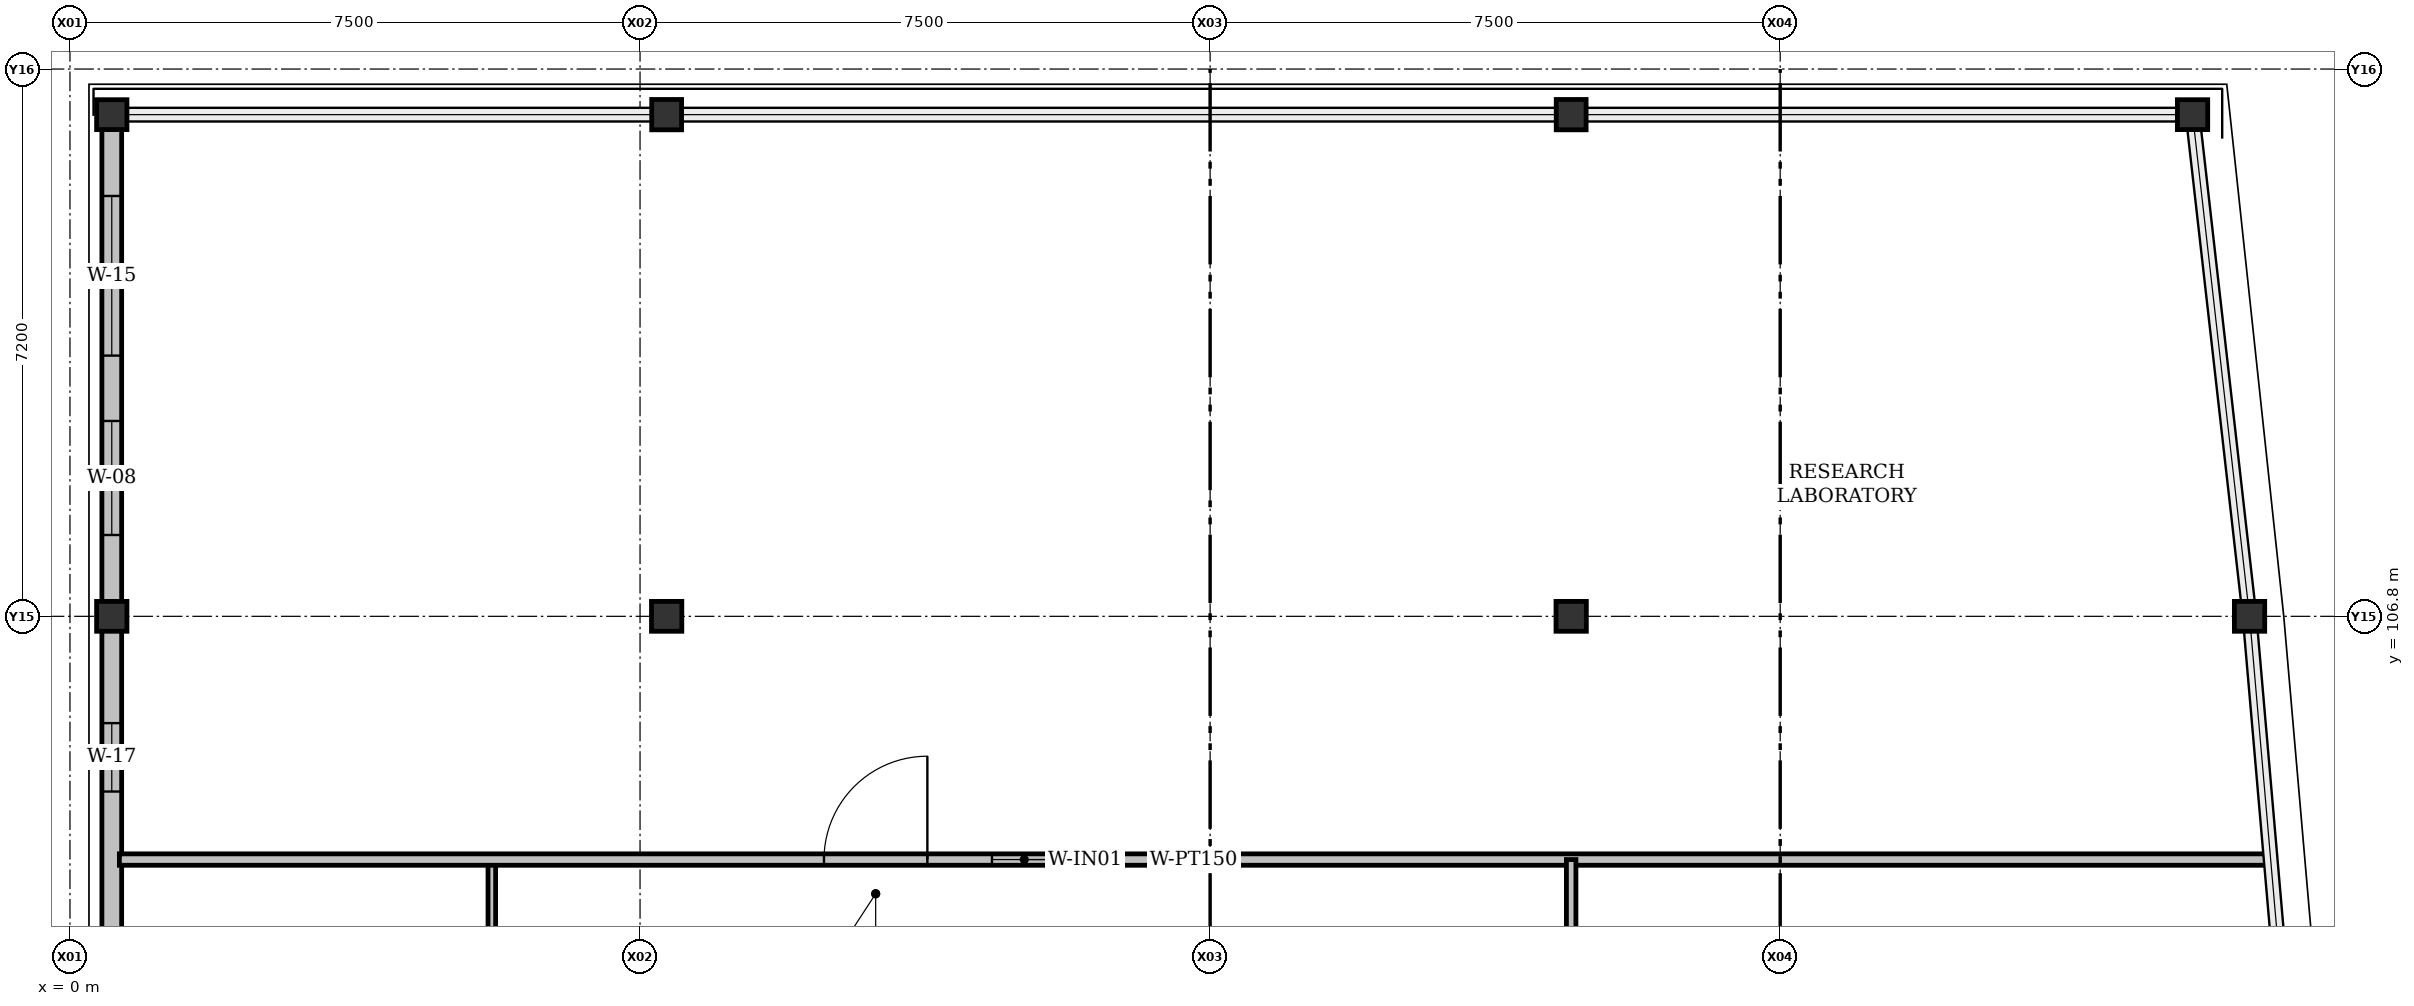
"""IFC4 building model, lengths in metres.
Left out: names, types, materials, properties, quantities, classifications, styles, units other than length and angle.
Written with IfcOpenShell. Run it as: python <this file> out.ifc"""

import sys

from ifc_helpers import new_model, si_unit, direction, frame, frame_2d, origin, origin_2d, place, context, subcontext, project, spatial, rectangle, i_section, extrude, element, fill, save


model = new_model("IFC4")
c1 = context("Model", 3, precision=1e-05, world=origin(), true_north=direction((0.0, 1.0)))
c2 = subcontext(c1, "Body", "Model", "MODEL_VIEW")
j1 = project(units=[si_unit("LENGTHUNIT", "METRE"), si_unit("PLANEANGLEUNIT", "RADIAN")], contexts=[c1])
p1 = place(None, origin())
s1 = spatial("IfcSite", under=j1, at=p1, CompositionType="ELEMENT")
p2 = place(p1, origin())
s2 = spatial("IfcBuilding", under=s1, at=p2, CompositionType="ELEMENT")
p3 = place(p2, frame((0.0, 0.0, 5.4)))
s3 = spatial("IfcBuildingStorey", under=s2, at=p3, CompositionType="ELEMENT", Elevation=5.4)
for number, where, z_axis, x_axis in (
    (1, (0.55, 106.8, 0.0), (0.0, 0.0, 1.0), (1.0, 0.0, 0.0)),
    (2, (7.85, 106.8, 0.0), (0.0, 0.0, 1.0), (1.0, 0.0, 0.0)),
    (3, (19.75, 106.8, 0.0), (0.0, 0.0, 1.0), (1.0, 0.0, 0.0)),
    (4, (28.675, 106.8, 0.0), (0.0, 0.0, 1.0), (1.0, 0.0, 0.0)),
    (5, (0.55, 113.4, 0.0), (0.0, 0.0, 1.0), (1.0, 0.0, 0.0)),
    (6, (7.85, 113.4, 0.0), (0.0, 0.0, 1.0), (0.0, 1.0, 0.0)),
    (7, (19.75, 113.4, 0.0), (0.0, 0.0, 1.0), (0.0, 1.0, 0.0)),
    (8, (27.925, 113.4, 0.0), (0.0, 0.0, 1.0), (1.0, 0.0, 0.0)),
):
    element("IfcColumn", number, at=place(p3, frame(where, z_axis=z_axis, x_axis=x_axis)), inside=s3, PredefinedType="COLUMN", context=c2, shape_type="SweptSolid", body=[
        extrude(i_section(OverallWidth=0.399, OverallDepth=0.393, WebThickness=0.023, FlangeThickness=0.036, FilletRadius=0.015, at=origin_2d()), origin(), (0.0, 0.0, 1.0), 4.5),
    ])
p4 = place(p3, frame((0.55, 99.6, 0.0), z_axis=(0.0, 0.0, 1.0), x_axis=(0.0, 1.0, 0.0)))
e9 = element("IfcWall", 9, at=p4, inside=s3, PredefinedType="SOLIDWALL", context=c2, shape_type="SweptSolid", body=[
    extrude(rectangle(XDim=7.2, YDim=0.26, at=frame_2d((3.6, 0.0))), origin(), (0.0, 0.0, 1.0), 3.847),
])
p5 = place(p4, frame((1.655, 0.0, 0.92)))
e10 = element("IfcOpeningElement", 10, at=p5, cuts=e9, PredefinedType="OPENING", context=c2, shape_type="SweptSolid", body=[
    extrude(rectangle(XDim=1.2, YDim=1.55, at=frame_2d((0.6, 0.775))), frame((0.0, 0.13, 0.0), z_axis=(0.0, -1.0, 0.0), x_axis=(1.0, 0.0, 0.0)), (0.0, 0.0, 1.0), 0.26),
])
p6 = place(p4, frame((4.895, 0.0, 0.92)))
e11 = element("IfcOpeningElement", 11, at=p6, cuts=e9, PredefinedType="OPENING", context=c2, shape_type="SweptSolid", body=[
    extrude(rectangle(XDim=0.9, YDim=1.3, at=frame_2d((0.45, 0.65))), frame((0.0, 0.13, 0.0), z_axis=(0.0, -1.0, 0.0), x_axis=(1.0, 0.0, 0.0)), (0.0, 0.0, 1.0), 0.26),
])
p7 = place(p3, frame((0.55, 106.8, 0.0), z_axis=(0.0, 0.0, 1.0), x_axis=(0.0, 1.0, 0.0)))
e12 = element("IfcWall", 12, at=p7, inside=s3, PredefinedType="SOLIDWALL", context=c2, shape_type="SweptSolid", body=[
    extrude(rectangle(XDim=6.6, YDim=0.26, at=frame_2d((3.3, 0.0))), origin(), (0.0, 0.0, 1.0), 3.847),
])
p8 = place(p7, frame((1.07, 0.0, 0.92)))
e13 = element("IfcOpeningElement", 13, at=p8, cuts=e12, PredefinedType="OPENING", context=c2, shape_type="SweptSolid", body=[
    extrude(rectangle(XDim=1.5, YDim=1.55, at=frame_2d((0.75, 0.775))), frame((0.0, 0.13, 0.0), z_axis=(0.0, -1.0, 0.0), x_axis=(1.0, 0.0, 0.0)), (0.0, 0.0, 1.0), 0.26),
])
p9 = place(p7, frame((3.43, 0.0, 0.92)))
e14 = element("IfcOpeningElement", 14, at=p9, cuts=e12, PredefinedType="OPENING", context=c2, shape_type="SweptSolid", body=[
    extrude(rectangle(XDim=2.1, YDim=1.7, at=frame_2d((1.05, 0.85))), frame((0.0, 0.13, 0.0), z_axis=(0.0, -1.0, 0.0), x_axis=(1.0, 0.0, 0.0)), (0.0, 0.0, 1.0), 0.26),
])
p10 = place(p3, frame((5.55, 75.8, 0.0), z_axis=(0.0, 0.0, 1.0), x_axis=(0.0, 1.0, 0.0)))
e15 = element("IfcWall", 15, at=p10, inside=s3, PredefinedType="PARTITIONING", context=c2, shape_type="SweptSolid", body=[
    extrude(rectangle(XDim=27.8, YDim=0.1, at=frame_2d((13.9, 0.0))), origin(), (0.0, 0.0, 1.0), 3.721),
])
p11 = place(p10, frame((13.26, 0.0, 0.0)))
e16 = element("IfcOpeningElement", 16, at=p11, cuts=e15, PredefinedType="OPENING", context=c2, shape_type="SweptSolid", body=[
    extrude(rectangle(XDim=1.28, YDim=2.25, at=frame_2d((0.64, 1.125))), frame((0.0, 0.05, 0.0), z_axis=(0.0, -1.0, 0.0), x_axis=(1.0, 0.0, 0.0)), (0.0, 0.0, 1.0), 0.1),
])
p12 = place(p10, frame((15.39, 0.0, 0.92)))
e17 = element("IfcOpeningElement", 17, at=p12, cuts=e15, PredefinedType="OPENING", context=c2, shape_type="SweptSolid", body=[
    extrude(rectangle(XDim=1.45, YDim=1.3, at=frame_2d((0.725, 0.65))), frame((0.0, 0.05, 0.0), z_axis=(0.0, -1.0, 0.0), x_axis=(1.0, 0.0, 0.0)), (0.0, 0.0, 1.0), 0.1),
])
p13 = place(p3, frame((0.65, 103.6, 0.0), z_axis=(0.0, 0.0, 1.0), x_axis=(1.0, 0.0, 0.0)))
e18 = element("IfcWall", 18, at=p13, inside=s3, PredefinedType="PARTITIONING", context=c2, shape_type="SweptSolid", body=[
    extrude(rectangle(XDim=28.265, YDim=0.15, at=frame_2d((14.133, 0.0))), origin(), (0.0, 0.0, 1.0), 3.797),
])
p14 = place(p13, frame((9.27, 0.0, 0.0)))
e19 = element("IfcOpeningElement", 19, at=p14, cuts=e18, PredefinedType="OPENING", context=c2, shape_type="SweptSolid", body=[
    extrude(rectangle(XDim=1.36, YDim=2.25, at=frame_2d((0.68, 1.125))), frame((0.0, 0.075, 0.0), z_axis=(0.0, -1.0, 0.0), x_axis=(1.0, 0.0, 0.0)), (0.0, 0.0, 1.0), 0.15),
])
p15 = place(p13, frame((11.48, 0.0, 0.92)))
e20 = element("IfcOpeningElement", 20, at=p15, cuts=e18, PredefinedType="OPENING", context=c2, shape_type="SweptSolid", body=[
    extrude(rectangle(XDim=0.85, YDim=1.1, at=frame_2d((0.425, 0.55))), frame((0.0, 0.075, 0.0), z_axis=(0.0, -1.0, 0.0), x_axis=(1.0, 0.0, 0.0)), (0.0, 0.0, 1.0), 0.15),
])
p16 = place(p3, frame((19.75, 103.6, 0.0), z_axis=(0.0, 0.0, 1.0), x_axis=(0.0, -1.0, 0.0)))
e21 = element("IfcWall", 21, at=p16, inside=s3, PredefinedType="PARTITIONING", context=c2, shape_type="SweptSolid", body=[
    extrude(rectangle(XDim=3.806, YDim=0.125, at=frame_2d((1.903, 0.0))), origin(), (0.0, 0.0, 1.0), 3.797),
])
p17 = place(p6, origin())
e22 = element("IfcWindow", 22, at=p17, inside=s3, PartitioningType="SINGLE_PANEL", PredefinedType="WINDOW", context=c2, shape_type="SweptSolid", body=[
    extrude(rectangle(XDim=0.9, YDim=1.3, at=frame_2d((0.45, 0.65))), frame((0.0, 0.03, 0.0), z_axis=(0.0, -1.0, 0.0), x_axis=(1.0, 0.0, 0.0)), (0.0, 0.0, 1.0), 0.06),
])
fill(e11, e22)
p18 = place(p8, origin())
e23 = element("IfcWindow", 23, at=p18, inside=s3, PartitioningType="SINGLE_PANEL", PredefinedType="WINDOW", context=c2, shape_type="SweptSolid", body=[
    extrude(rectangle(XDim=1.5, YDim=1.55, at=frame_2d((0.75, 0.775))), frame((0.0, 0.03, 0.0), z_axis=(0.0, -1.0, 0.0), x_axis=(1.0, 0.0, 0.0)), (0.0, 0.0, 1.0), 0.06),
])
fill(e13, e23)
p19 = place(p9, origin())
e24 = element("IfcWindow", 24, at=p19, inside=s3, PartitioningType="DOUBLE_PANEL_VERTICAL", PredefinedType="WINDOW", context=c2, shape_type="SweptSolid", body=[
    extrude(rectangle(XDim=2.1, YDim=1.7, at=frame_2d((1.05, 0.85))), frame((0.0, 0.03, 0.0), z_axis=(0.0, -1.0, 0.0), x_axis=(1.0, 0.0, 0.0)), (0.0, 0.0, 1.0), 0.06),
])
fill(e14, e24)
p20 = place(p14, origin())
e25 = element("IfcDoor", 25, at=p20, inside=s3, OperationType="SINGLE_SWING_RIGHT", PredefinedType="DOOR", context=c2, shape_type="SweptSolid", body=[
    extrude(rectangle(XDim=1.36, YDim=2.25, at=frame_2d((0.68, 1.125))), frame((0.0, 0.025, 0.0), z_axis=(0.0, -1.0, 0.0), x_axis=(1.0, 0.0, 0.0)), (0.0, 0.0, 1.0), 0.05),
])
fill(e19, e25)
p21 = place(p15, origin())
e26 = element("IfcWindow", 26, at=p21, inside=s3, PartitioningType="SINGLE_PANEL", PredefinedType="WINDOW", context=c2, shape_type="SweptSolid", body=[
    extrude(rectangle(XDim=0.85, YDim=1.1, at=frame_2d((0.425, 0.55))), frame((0.0, 0.03, 0.0), z_axis=(0.0, -1.0, 0.0), x_axis=(1.0, 0.0, 0.0)), (0.0, 0.0, 1.0), 0.06),
])
fill(e20, e26)
save(model, sys.argv[1])
